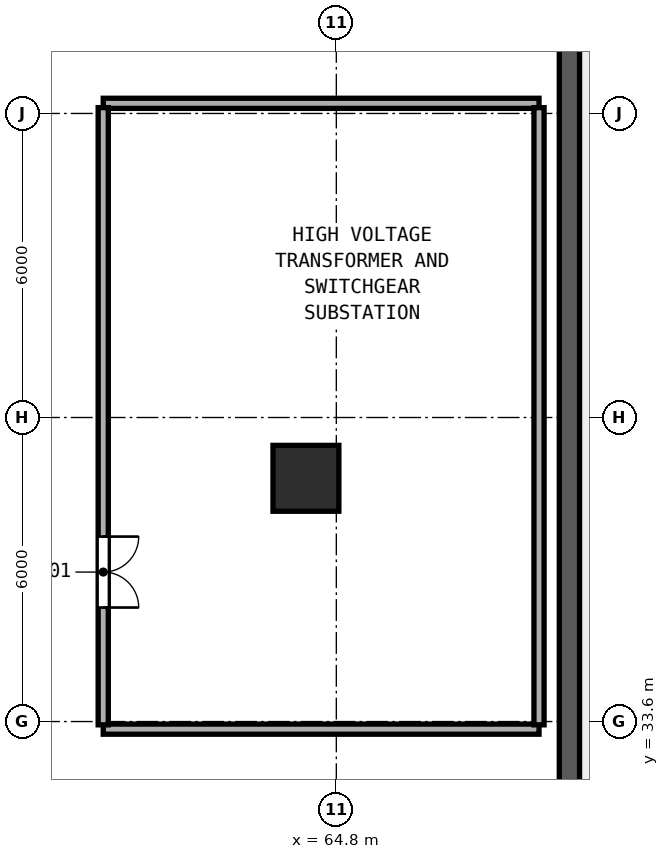
"""IFC4 building model, lengths in metres.
Left out: names, types, materials, properties, quantities, classifications, styles, units other than length and angle.
Written with IfcOpenShell. Run it as: python <this file> out.ifc"""

import sys

from ifc_helpers import new_model, si_unit, direction, frame, frame_2d, origin, origin_2d, place, context, subcontext, project, spatial, rectangle, hollow_rectangle, extrude, element, fill, save


model = new_model("IFC4")
c1 = context("Model", 3, precision=1e-05, world=origin(), true_north=direction((0.0, 1.0)))
c2 = subcontext(c1, "Body", "Model", "MODEL_VIEW")
j1 = project(units=[si_unit("LENGTHUNIT", "METRE"), si_unit("PLANEANGLEUNIT", "RADIAN")], contexts=[c1])
p1 = place(None, origin())
s1 = spatial("IfcSite", under=j1, at=p1, CompositionType="ELEMENT")
p2 = place(p1, origin())
s2 = spatial("IfcBuilding", under=s1, at=p2, CompositionType="ELEMENT")
p3 = place(p2, frame((0.0, 0.0, -4.8)))
s3 = spatial("IfcBuildingStorey", under=s2, at=p3, CompositionType="ELEMENT", Elevation=-4.8)
p4 = place(p3, frame((69.4, 10.5, 0.0), z_axis=(0.0, 0.0, 1.0), x_axis=(0.0, 1.0, 0.0)))
e1 = element("IfcWall", 1, at=p4, inside=s3, PredefinedType="SOLIDWALL", context=c2, shape_type="SweptSolid", body=[
    extrude(rectangle(XDim=36.5, YDim=0.4, at=frame_2d((18.25, 0.0))), origin(), (0.0, 0.0, 1.0), 4.5),
])
p5 = place(p3, frame((64.2, 38.4, 0.0), z_axis=(0.0, 0.0, 1.0), x_axis=(1.0, 0.0, 0.0)))
e2 = element("IfcColumn", 2, at=p5, inside=s3, PredefinedType="COLUMN", context=c2, shape_type="SweptSolid", body=[
    extrude(hollow_rectangle(XDim=1.3, YDim=1.3, WallThickness=0.048, at=origin_2d()), origin(), (0.0, 0.0, 1.0), 4.8),
])
for number, where, z_axis, x_axis in (
    (3, (60.2, 45.8, 0.0), (0.0, 0.0, 1.0), (1.0, 0.0, 0.0)),
    (4, (60.2, 33.45, 0.0), (0.0, 0.0, 1.0), (1.0, 0.0, 0.0)),
):
    element("IfcWall", number, at=place(p3, frame(where, z_axis=z_axis, x_axis=x_axis)), inside=s3, PredefinedType="SOLIDWALL", context=c2, shape_type="SweptSolid", body=[
        extrude(rectangle(XDim=8.6, YDim=0.2, at=frame_2d((4.3, 0.0))), origin(), (0.0, 0.0, 1.0), 4.5),
    ])
p6 = place(p3, frame((60.2, 33.535, 0.0), z_axis=(0.0, 0.0, 1.0), x_axis=(0.0, 1.0, 0.0)))
e5 = element("IfcWall", 5, at=p6, inside=s3, PredefinedType="SOLIDWALL", context=c2, shape_type="SweptSolid", body=[
    extrude(rectangle(XDim=12.18, YDim=0.2, at=frame_2d((6.09, 0.0))), origin(), (0.0, 0.0, 1.0), 4.5),
])
p7 = place(p6, frame((3.715, 0.0, 0.0), z_axis=(0.0, 0.0, 1.0), x_axis=(-1.0, 0.0, 0.0)))
e6 = element("IfcOpeningElement", 6, at=p7, cuts=e5, PredefinedType="OPENING", context=c2, shape_type="SweptSolid", body=[
    extrude(rectangle(XDim=1.4, YDim=2.2, at=frame_2d((0.7, 1.1))), frame((0.0, 0.11, 0.0), z_axis=(0.0, -1.0, 0.0), x_axis=(1.0, 0.0, 0.0)), (0.0, 0.0, 1.0), 0.22),
])
p8 = place(p3, frame((68.8, 33.535, 0.0), z_axis=(0.0, 0.0, 1.0), x_axis=(0.0, 1.0, 0.0)))
e7 = element("IfcWall", 7, at=p8, inside=s3, PredefinedType="SOLIDWALL", context=c2, shape_type="SweptSolid", body=[
    extrude(rectangle(XDim=12.18, YDim=0.2, at=frame_2d((6.09, 0.0))), origin(), (0.0, 0.0, 1.0), 4.5),
])
p9 = place(p7, origin())
e8 = element("IfcDoor", 8, at=p9, inside=s3, OperationType="DOUBLE_DOOR_SINGLE_SWING", PredefinedType="DOOR", context=c2, shape_type="SweptSolid", body=[
    extrude(rectangle(XDim=1.4, YDim=2.2, at=frame_2d((0.7, 1.1))), frame((0.0, 0.025, 0.0), z_axis=(0.0, -1.0, 0.0), x_axis=(1.0, 0.0, 0.0)), (0.0, 0.0, 1.0), 0.05),
])
fill(e6, e8)
save(model, sys.argv[1])
